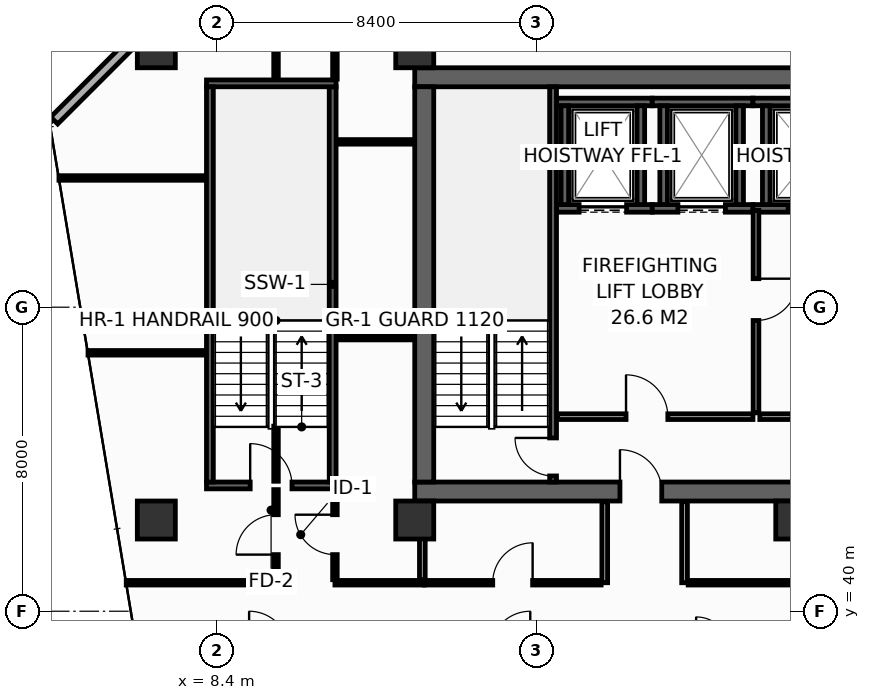
"""IFC4 building model, lengths in metres.
Left out: names, types, materials, properties, quantities, classifications, styles, units other than length and angle.
Written with IfcOpenShell. Run it as: python <this file> out.ifc"""

import sys

from ifc_helpers import new_model, si_unit, direction, frame, frame_2d, origin, origin_2d, place, context, subcontext, project, spatial, rectangle, hollow_rectangle, extrude, element, fill, save


model = new_model("IFC4")
c1 = context("Model", 3, precision=1e-05, world=origin(), true_north=direction((0.0, 1.0)))
c2 = subcontext(c1, "Body", "Model", "MODEL_VIEW")
j1 = project(units=[si_unit("LENGTHUNIT", "METRE"), si_unit("PLANEANGLEUNIT", "RADIAN")], contexts=[c1])
p1 = place(None, origin())
s1 = spatial("IfcSite", under=j1, at=p1, CompositionType="ELEMENT")
p2 = place(p1, origin())
s2 = spatial("IfcBuilding", under=s1, at=p2, CompositionType="ELEMENT")
p3 = place(p2, frame((0.0, 0.0, 137.2)))
s3 = spatial("IfcBuildingStorey", under=s2, at=p3, CompositionType="ELEMENT", Elevation=137.2)
p4 = place(p3, frame((13.6, 43.15, 0.0), z_axis=(0.0, 0.0, 1.0), x_axis=(1.0, 0.0, 0.0)))
e1 = element("IfcWall", 1, at=p4, inside=s3, PredefinedType="SHEAR", context=c2, shape_type="SweptSolid", body=[
    extrude(rectangle(XDim=32.7, YDim=0.5, at=frame_2d((16.35, 0.0))), origin(), (0.0, 0.0, 1.0), 3.55),
])
p5 = place(p4, frame((5.4, 0.0, 0.0)))
e2 = element("IfcOpeningElement", 2, at=p5, cuts=e1, PredefinedType="OPENING", context=c2, shape_type="SweptSolid", body=[
    extrude(rectangle(XDim=1.1, YDim=2.15, at=frame_2d((0.55, 1.075))), frame((0.0, 0.26, 0.0), z_axis=(0.0, -1.0, 0.0), x_axis=(1.0, 0.0, 0.0)), (0.0, 0.0, 1.0), 0.52),
])
p6 = place(p4, frame((25.6, 0.0, 0.0)))
e3 = element("IfcOpeningElement", 3, at=p6, cuts=e1, PredefinedType="OPENING", context=c2, shape_type="SweptSolid", body=[
    extrude(rectangle(XDim=1.1, YDim=2.15, at=frame_2d((0.55, 1.075))), frame((0.0, 0.26, 0.0), z_axis=(0.0, -1.0, 0.0), x_axis=(1.0, 0.0, 0.0)), (0.0, 0.0, 1.0), 0.52),
])
p7 = place(p3, frame((13.6, 54.05, 0.0), z_axis=(0.0, 0.0, 1.0), x_axis=(1.0, 0.0, 0.0)))
e4 = element("IfcWall", 4, at=p7, inside=s3, PredefinedType="SHEAR", context=c2, shape_type="SweptSolid", body=[
    extrude(rectangle(XDim=32.7, YDim=0.5, at=frame_2d((16.35, 0.0))), origin(), (0.0, 0.0, 1.0), 3.55),
])
p8 = place(p3, frame((13.85, 43.4, 0.0), z_axis=(0.0, 0.0, 1.0), x_axis=(0.0, 1.0, 0.0)))
e5 = element("IfcWall", 5, at=p8, inside=s3, PredefinedType="SHEAR", context=c2, shape_type="SweptSolid", body=[
    extrude(rectangle(XDim=10.4, YDim=0.5, at=frame_2d((5.2, 0.0))), origin(), (0.0, 0.0, 1.0), 3.55),
])
for number, where, z_axis, x_axis in (
    (6, (6.8, 54.8, 0.0), (0.0, 0.0, 1.0), (1.0, 0.0, 0.0)),
    (7, (13.6, 54.8, 0.0), (0.0, 0.0, 1.0), (1.0, 0.0, 0.0)),
    (8, (6.8, 42.4, 0.0), (0.0, 0.0, 1.0), (1.0, 0.0, 0.0)),
    (9, (13.6, 42.4, 0.0), (0.0, 0.0, 1.0), (1.0, 0.0, 0.0)),
    (10, (23.6, 42.4, 0.0), (0.0, 0.0, 1.0), (1.0, 0.0, 0.0)),
):
    element("IfcColumn", number, at=place(p3, frame(where, z_axis=z_axis, x_axis=x_axis)), inside=s3, PredefinedType="COLUMN", context=c2, shape_type="SweptSolid", body=[
        extrude(hollow_rectangle(XDim=1.0, YDim=1.0, WallThickness=0.045, at=origin_2d()), origin(), (0.0, 0.0, 1.0), 3.8),
    ])
p9 = place(p3, frame((17.33, 50.6, 0.0), z_axis=(0.0, 0.0, 1.0), x_axis=(1.0, 0.0, 0.0)))
e11 = element("IfcWall", 11, at=p9, inside=s3, PredefinedType="SHEAR", context=c2, shape_type="SweptSolid", body=[
    extrude(rectangle(XDim=2.52, YDim=0.2, at=frame_2d((1.26, 0.0))), origin(), (0.0, 0.0, 1.0), 3.55),
])
p10 = place(p9, frame((0.595, 0.0, 0.0)))
e12 = element("IfcOpeningElement", 12, at=p10, cuts=e11, PredefinedType="OPENING", context=c2, shape_type="SweptSolid", body=[
    extrude(rectangle(XDim=1.25, YDim=2.3, at=frame_2d((0.625, 1.15))), frame((0.0, 0.11, 0.0), z_axis=(0.0, -1.0, 0.0), x_axis=(1.0, 0.0, 0.0)), (0.0, 0.0, 1.0), 0.22),
])
p11 = place(p3, frame((17.33, 53.4, 0.0), z_axis=(0.0, 0.0, 1.0), x_axis=(1.0, 0.0, 0.0)))
e13 = element("IfcWall", 13, at=p11, inside=s3, PredefinedType="SHEAR", context=c2, shape_type="SweptSolid", body=[
    extrude(rectangle(XDim=2.52, YDim=0.2, at=frame_2d((1.26, 0.0))), origin(), (0.0, 0.0, 1.0), 3.55),
])
for number, where, z_axis, x_axis in (
    (14, (17.55, 50.7, 0.0), (0.0, 0.0, 1.0), (0.0, 1.0, 0.0)),
    (15, (19.55, 50.7, 0.0), (0.0, 0.0, 1.0), (0.0, 1.0, 0.0)),
):
    element("IfcWall", number, at=place(p3, frame(where, z_axis=z_axis, x_axis=x_axis)), inside=s3, PredefinedType="SHEAR", context=c2, shape_type="SweptSolid", body=[
        extrude(rectangle(XDim=2.6, YDim=0.2, at=frame_2d((1.3, 0.0))), origin(), (0.0, 0.0, 1.0), 3.55),
    ])
p12 = place(p3, frame((19.85, 50.6, 0.0), z_axis=(0.0, 0.0, 1.0), x_axis=(1.0, 0.0, 0.0)))
e16 = element("IfcWall", 16, at=p12, inside=s3, PredefinedType="SHEAR", context=c2, shape_type="SweptSolid", body=[
    extrude(rectangle(XDim=2.65, YDim=0.2, at=frame_2d((1.325, 0.0))), origin(), (0.0, 0.0, 1.0), 3.55),
])
p13 = place(p12, frame((0.675, 0.0, 0.0)))
e17 = element("IfcOpeningElement", 17, at=p13, cuts=e16, PredefinedType="OPENING", context=c2, shape_type="SweptSolid", body=[
    extrude(rectangle(XDim=1.25, YDim=2.3, at=frame_2d((0.625, 1.15))), frame((0.0, 0.11, 0.0), z_axis=(0.0, -1.0, 0.0), x_axis=(1.0, 0.0, 0.0)), (0.0, 0.0, 1.0), 0.22),
])
p14 = place(p3, frame((19.85, 53.4, 0.0), z_axis=(0.0, 0.0, 1.0), x_axis=(1.0, 0.0, 0.0)))
e18 = element("IfcWall", 18, at=p14, inside=s3, PredefinedType="SHEAR", context=c2, shape_type="SweptSolid", body=[
    extrude(rectangle(XDim=2.65, YDim=0.2, at=frame_2d((1.325, 0.0))), origin(), (0.0, 0.0, 1.0), 3.55),
])
for number, where, z_axis, x_axis in (
    (19, (20.15, 50.7, 0.0), (0.0, 0.0, 1.0), (0.0, 1.0, 0.0)),
    (20, (22.15, 50.7, 0.0), (0.0, 0.0, 1.0), (0.0, 1.0, 0.0)),
):
    element("IfcWall", number, at=place(p3, frame(where, z_axis=z_axis, x_axis=x_axis)), inside=s3, PredefinedType="SHEAR", context=c2, shape_type="SweptSolid", body=[
        extrude(rectangle(XDim=2.6, YDim=0.2, at=frame_2d((1.3, 0.0))), origin(), (0.0, 0.0, 1.0), 3.55),
    ])
p15 = place(p3, frame((22.5, 50.6, 0.0), z_axis=(0.0, 0.0, 1.0), x_axis=(1.0, 0.0, 0.0)))
e21 = element("IfcWall", 21, at=p15, inside=s3, PredefinedType="SHEAR", context=c2, shape_type="SweptSolid", body=[
    extrude(rectangle(XDim=2.85, YDim=0.2, at=frame_2d((1.425, 0.0))), origin(), (0.0, 0.0, 1.0), 3.55),
])
p16 = place(p15, frame((0.925, 0.0, 0.0)))
e22 = element("IfcOpeningElement", 22, at=p16, cuts=e21, PredefinedType="OPENING", context=c2, shape_type="SweptSolid", body=[
    extrude(rectangle(XDim=1.25, YDim=2.3, at=frame_2d((0.625, 1.15))), frame((0.0, 0.11, 0.0), z_axis=(0.0, -1.0, 0.0), x_axis=(1.0, 0.0, 0.0)), (0.0, 0.0, 1.0), 0.22),
])
p17 = place(p3, frame((22.5, 53.4, 0.0), z_axis=(0.0, 0.0, 1.0), x_axis=(1.0, 0.0, 0.0)))
e23 = element("IfcWall", 23, at=p17, inside=s3, PredefinedType="SHEAR", context=c2, shape_type="SweptSolid", body=[
    extrude(rectangle(XDim=2.85, YDim=0.2, at=frame_2d((1.425, 0.0))), origin(), (0.0, 0.0, 1.0), 3.55),
])
p18 = place(p3, frame((22.85, 50.7, 0.0), z_axis=(0.0, 0.0, 1.0), x_axis=(0.0, 1.0, 0.0)))
e24 = element("IfcWall", 24, at=p18, inside=s3, PredefinedType="SHEAR", context=c2, shape_type="SweptSolid", body=[
    extrude(rectangle(XDim=2.6, YDim=0.2, at=frame_2d((1.3, 0.0))), origin(), (0.0, 0.0, 1.0), 3.55),
])
p19 = place(p3, frame((17.24, 43.4, 0.0), z_axis=(0.0, 0.0, 1.0), x_axis=(0.0, 1.0, 0.0)))
e25 = element("IfcWall", 25, at=p19, inside=s3, PredefinedType="SHEAR", context=c2, shape_type="SweptSolid", body=[
    extrude(rectangle(XDim=10.4, YDim=0.18, at=frame_2d((5.2, 0.0))), origin(), (0.0, 0.0, 1.0), 3.55),
])
p20 = place(p19, frame((0.16, 0.0, 0.0)))
e26 = element("IfcOpeningElement", 26, at=p20, cuts=e25, PredefinedType="OPENING", context=c2, shape_type="SweptSolid", body=[
    extrude(rectangle(XDim=1.0, YDim=2.15, at=frame_2d((0.5, 1.075))), frame((0.0, 0.1, 0.0), z_axis=(0.0, -1.0, 0.0), x_axis=(1.0, 0.0, 0.0)), (0.0, 0.0, 1.0), 0.2),
])
p21 = place(p3, frame((8.12, 43.31, 0.0), z_axis=(0.0, 0.0, 1.0), x_axis=(1.0, 0.0, 0.0)))
e27 = element("IfcWall", 27, at=p21, inside=s3, PredefinedType="SHEAR", context=c2, shape_type="SweptSolid", body=[
    extrude(rectangle(XDim=3.41, YDim=0.18, at=frame_2d((1.705, 0.0))), origin(), (0.0, 0.0, 1.0), 3.55),
])
p22 = place(p21, frame((1.15, 0.0, 0.0)))
e28 = element("IfcOpeningElement", 28, at=p22, cuts=e27, PredefinedType="OPENING", context=c2, shape_type="SweptSolid", body=[
    extrude(rectangle(XDim=1.1, YDim=2.15, at=frame_2d((0.55, 1.075))), frame((0.0, 0.1, 0.0), z_axis=(0.0, -1.0, 0.0), x_axis=(1.0, 0.0, 0.0)), (0.0, 0.0, 1.0), 0.2),
])
p23 = place(p3, frame((11.44, 43.4, 0.0), z_axis=(0.0, 0.0, 1.0), x_axis=(0.0, 1.0, 0.0)))
e29 = element("IfcWall", 29, at=p23, inside=s3, PredefinedType="SHEAR", context=c2, shape_type="SweptSolid", body=[
    extrude(rectangle(XDim=10.4, YDim=0.18, at=frame_2d((5.2, 0.0))), origin(), (0.0, 0.0, 1.0), 3.55),
])
p24 = place(p3, frame((11.53, 53.89, 0.0), z_axis=(0.0, 0.0, 1.0), x_axis=(-1.0, 0.0, 0.0)))
e30 = element("IfcWall", 30, at=p24, inside=s3, PredefinedType="SHEAR", context=c2, shape_type="SweptSolid", body=[
    extrude(rectangle(XDim=3.41, YDim=0.18, at=frame_2d((1.705, 0.0))), origin(), (0.0, 0.0, 1.0), 3.55),
])
p25 = place(p3, frame((8.21, 53.8, 0.0), z_axis=(0.0, 0.0, 1.0), x_axis=(0.0, -1.0, 0.0)))
e31 = element("IfcWall", 31, at=p25, inside=s3, PredefinedType="SHEAR", context=c2, shape_type="SweptSolid", body=[
    extrude(rectangle(XDim=10.4, YDim=0.18, at=frame_2d((5.2, 0.0))), origin(), (0.0, 0.0, 1.0), 3.55),
])
p26 = place(p3, frame((17.36, 45.12, 0.0), z_axis=(0.0, 0.0, 1.0), x_axis=(1.0, 0.0, 0.0)))
e32 = element("IfcWall", 32, at=p26, inside=s3, PredefinedType="PARTITIONING", context=c2, shape_type="SweptSolid", body=[
    extrude(rectangle(XDim=5.14, YDim=0.15, at=frame_2d((2.57, 0.0))), origin(), (0.0, 0.0, 1.0), 3.55),
])
p27 = place(p26, frame((1.8, 0.0, 0.0)))
e33 = element("IfcOpeningElement", 33, at=p27, cuts=e32, PredefinedType="OPENING", context=c2, shape_type="SweptSolid", body=[
    extrude(rectangle(XDim=1.1, YDim=2.15, at=frame_2d((0.55, 1.075))), frame((0.0, 0.085, 0.0), z_axis=(0.0, -1.0, 0.0), x_axis=(1.0, 0.0, 0.0)), (0.0, 0.0, 1.0), 0.17),
])
p28 = place(p3, frame((22.58, 50.55, 0.0), z_axis=(0.0, 0.0, 1.0), x_axis=(0.0, -1.0, 0.0)))
e34 = element("IfcWall", 34, at=p28, inside=s3, PredefinedType="PARTITIONING", context=c2, shape_type="SweptSolid", body=[
    extrude(rectangle(XDim=5.33, YDim=0.15, at=frame_2d((2.665, 0.0))), origin(), (0.0, 0.0, 1.0), 3.55),
])
p29 = place(p28, frame((1.8, 0.0, 0.0)))
e35 = element("IfcOpeningElement", 35, at=p29, cuts=e34, PredefinedType="OPENING", context=c2, shape_type="SweptSolid", body=[
    extrude(rectangle(XDim=1.1, YDim=2.15, at=frame_2d((0.55, 1.075))), frame((0.0, 0.085, 0.0), z_axis=(0.0, -1.0, 0.0), x_axis=(1.0, 0.0, 0.0)), (0.0, 0.0, 1.0), 0.17),
])
p30 = place(p3, frame((22.68, 45.12, 0.0), z_axis=(0.0, 0.0, 1.0), x_axis=(1.0, 0.0, 0.0)))
e36 = element("IfcWall", 36, at=p30, inside=s3, PredefinedType="PARTITIONING", context=c2, shape_type="SweptSolid", body=[
    extrude(rectangle(XDim=2.92, YDim=0.15, at=frame_2d((1.46, 0.0))), origin(), (0.0, 0.0, 1.0), 3.55),
])
p31 = place(p30, frame((0.85, 0.0, 0.0)))
e37 = element("IfcOpeningElement", 37, at=p31, cuts=e36, PredefinedType="OPENING", context=c2, shape_type="SweptSolid", body=[
    extrude(rectangle(XDim=1.1, YDim=2.15, at=frame_2d((0.55, 1.075))), frame((0.0, 0.085, 0.0), z_axis=(0.0, -1.0, 0.0), x_axis=(1.0, 0.0, 0.0)), (0.0, 0.0, 1.0), 0.17),
])
p32 = place(p3, frame((7.087, 55.887, 0.0), z_axis=(0.0, 0.0, 1.0), x_axis=(-0.707106781187, -0.707106781187, 0.0)))
e38 = element("IfcWall", 38, at=p32, inside=s3, PredefinedType="STANDARD", context=c2, shape_type="SweptSolid", body=[
    extrude(rectangle(XDim=4.206, YDim=0.26, at=frame_2d((2.103, 0.0))), origin(), (0.0, 0.0, 1.0), 3.55),
])
p33 = place(p3, frame((6.008, 40.75, 0.0), z_axis=(0.0, 0.0, 1.0), x_axis=(1.0, 0.0, 0.0)))
e39 = element("IfcWall", 39, at=p33, inside=s3, PredefinedType="PARTITIONING", context=c2, shape_type="SweptSolid", body=[
    extrude(rectangle(XDim=3.942, YDim=0.12, at=frame_2d((1.971, 0.0))), origin(), (0.0, 0.0, 1.0), 3.035),
])
p34 = place(p3, frame((11.5, 40.75, 0.0), z_axis=(0.0, 0.0, 1.0), x_axis=(1.0, 0.0, 0.0)))
e40 = element("IfcWall", 40, at=p34, inside=s3, PredefinedType="PARTITIONING", context=c2, shape_type="SweptSolid", body=[
    extrude(rectangle(XDim=2.35, YDim=0.12, at=frame_2d((1.175, 0.0))), origin(), (0.0, 0.0, 1.0), 3.55),
])
p35 = place(p3, frame((11.55, 52.35, 0.0), z_axis=(0.0, 0.0, 1.0), x_axis=(1.0, 0.0, 0.0)))
e41 = element("IfcWall", 41, at=p35, inside=s3, PredefinedType="PARTITIONING", context=c2, shape_type="SweptSolid", body=[
    extrude(rectangle(XDim=2.03, YDim=0.12, at=frame_2d((1.015, 0.0))), origin(), (0.0, 0.0, 1.0), 3.55),
])
p36 = place(p3, frame((11.5, 54.0, 0.0), z_axis=(0.0, 0.0, 1.0), x_axis=(0.0, 1.0, 0.0)))
e42 = element("IfcWall", 42, at=p36, inside=s3, PredefinedType="PARTITIONING", context=c2, shape_type="SweptSolid", body=[
    extrude(rectangle(XDim=1.995, YDim=0.12, at=frame_2d((0.998, 0.0))), origin(), (0.0, 0.0, 1.0), 2.935),
])
p37 = place(p3, frame((5.003, 46.8, 0.0), z_axis=(0.0, 0.0, 1.0), x_axis=(1.0, 0.0, 0.0)))
e43 = element("IfcWall", 43, at=p37, inside=s3, PredefinedType="PARTITIONING", context=c2, shape_type="SweptSolid", body=[
    extrude(rectangle(XDim=3.097, YDim=0.12, at=frame_2d((1.549, 0.0))), origin(), (0.0, 0.0, 1.0), 2.835),
])
p38 = place(p3, frame((4.238, 51.4, 0.0), z_axis=(0.0, 0.0, 1.0), x_axis=(1.0, 0.0, 0.0)))
e44 = element("IfcWall", 44, at=p38, inside=s3, PredefinedType="PARTITIONING", context=c2, shape_type="SweptSolid", body=[
    extrude(rectangle(XDim=3.862, YDim=0.12, at=frame_2d((1.931, 0.0))), origin(), (0.0, 0.0, 1.0), 2.835),
])
p39 = place(p3, frame((9.95, 40.83, 0.0), z_axis=(0.0, 0.0, 1.0), x_axis=(0.0, 1.0, 0.0)))
e45 = element("IfcWall", 45, at=p39, inside=s3, PredefinedType="PARTITIONING", context=c2, shape_type="SweptSolid", body=[
    extrude(rectangle(XDim=2.37, YDim=0.12, at=frame_2d((1.185, 0.0))), origin(), (0.0, 0.0, 1.0), 2.835),
])
p40 = place(p39, frame((0.66, 0.0, 0.0)))
e46 = element("IfcOpeningElement", 46, at=p40, cuts=e45, PredefinedType="OPENING", context=c2, shape_type="SweptSolid", body=[
    extrude(rectangle(XDim=1.05, YDim=2.15, at=frame_2d((0.525, 1.075))), frame((0.0, 0.07, 0.0), z_axis=(0.0, -1.0, 0.0), x_axis=(1.0, 0.0, 0.0)), (0.0, 0.0, 1.0), 0.14),
])
p41 = place(p3, frame((9.95, 43.42, 0.0), z_axis=(0.0, 0.0, 1.0), x_axis=(0.0, 1.0, 0.0)))
e47 = element("IfcWall", 47, at=p41, inside=s3, PredefinedType="PARTITIONING", context=c2, shape_type="SweptSolid", body=[
    extrude(rectangle(XDim=1.45, YDim=0.12, at=frame_2d((0.725, 0.0))), origin(), (0.0, 0.0, 1.0), 3.55),
])
p42 = place(p3, frame((9.95, 54.0, 0.0), z_axis=(0.0, 0.0, 1.0), x_axis=(0.0, 1.0, 0.0)))
e48 = element("IfcWall", 48, at=p42, inside=s3, PredefinedType="PARTITIONING", context=c2, shape_type="SweptSolid", body=[
    extrude(rectangle(XDim=1.995, YDim=0.12, at=frame_2d((0.998, 0.0))), origin(), (0.0, 0.0, 1.0), 2.935),
])
p43 = place(p3, frame((11.55, 47.2, 0.0), z_axis=(0.0, 0.0, 1.0), x_axis=(1.0, 0.0, 0.0)))
e49 = element("IfcWall", 49, at=p43, inside=s3, PredefinedType="PARTITIONING", context=c2, shape_type="SweptSolid", body=[
    extrude(rectangle(XDim=2.03, YDim=0.12, at=frame_2d((1.015, 0.0))), origin(), (0.0, 0.0, 1.0), 3.55),
])
p44 = place(p3, frame((11.5, 40.83, 0.0), z_axis=(0.0, 0.0, 1.0), x_axis=(0.0, 1.0, 0.0)))
e50 = element("IfcWall", 50, at=p44, inside=s3, PredefinedType="PARTITIONING", context=c2, shape_type="SweptSolid", body=[
    extrude(rectangle(XDim=2.37, YDim=0.12, at=frame_2d((1.185, 0.0))), origin(), (0.0, 0.0, 1.0), 2.835),
])
p45 = place(p44, frame((0.66, 0.0, 0.0)))
e51 = element("IfcOpeningElement", 51, at=p45, cuts=e50, PredefinedType="OPENING", context=c2, shape_type="SweptSolid", body=[
    extrude(rectangle(XDim=1.05, YDim=2.15, at=frame_2d((0.525, 1.075))), frame((0.0, 0.07, 0.0), z_axis=(0.0, -1.0, 0.0), x_axis=(1.0, 0.0, 0.0)), (0.0, 0.0, 1.0), 0.14),
])
p46 = place(p3, frame((13.8, 40.83, 0.0), z_axis=(0.0, 0.0, 1.0), x_axis=(0.0, 1.0, 0.0)))
e52 = element("IfcWall", 52, at=p46, inside=s3, PredefinedType="PARTITIONING", context=c2, shape_type="SweptSolid", body=[
    extrude(rectangle(XDim=2.05, YDim=0.15, at=frame_2d((1.025, 0.0))), origin(), (0.0, 0.0, 1.0), 3.55),
])
for number, where, z_axis, x_axis in (
    (53, (18.6, 40.75, 0.0), (0.0, 0.0, 1.0), (0.0, 1.0, 0.0)),
    (54, (20.7, 40.75, 0.0), (0.0, 0.0, 1.0), (0.0, 1.0, 0.0)),
):
    element("IfcWall", number, at=place(p3, frame(where, z_axis=z_axis, x_axis=x_axis)), inside=s3, PredefinedType="PARTITIONING", context=c2, shape_type="SweptSolid", body=[
        extrude(rectangle(XDim=2.13, YDim=0.15, at=frame_2d((1.065, 0.0))), origin(), (0.0, 0.0, 1.0), 3.55),
    ])
p47 = place(p3, frame((13.85, 40.75, 0.0), z_axis=(0.0, 0.0, 1.0), x_axis=(1.0, 0.0, 0.0)))
e55 = element("IfcWall", 55, at=p47, inside=s3, PredefinedType="PARTITIONING", context=c2, shape_type="SweptSolid", body=[
    extrude(rectangle(XDim=4.655, YDim=0.12, at=frame_2d((2.327, 0.0))), origin(), (0.0, 0.0, 1.0), 3.55),
])
p48 = place(p47, frame((1.802, 0.0, 0.0)))
e56 = element("IfcOpeningElement", 56, at=p48, cuts=e55, PredefinedType="OPENING", context=c2, shape_type="SweptSolid", body=[
    extrude(rectangle(XDim=1.05, YDim=2.15, at=frame_2d((0.525, 1.075))), frame((0.0, 0.07, 0.0), z_axis=(0.0, -1.0, 0.0), x_axis=(1.0, 0.0, 0.0)), (0.0, 0.0, 1.0), 0.14),
])
p49 = place(p3, frame((20.795, 40.75, 0.0), z_axis=(0.0, 0.0, 1.0), x_axis=(1.0, 0.0, 0.0)))
e57 = element("IfcWall", 57, at=p49, inside=s3, PredefinedType="PARTITIONING", context=c2, shape_type="SweptSolid", body=[
    extrude(rectangle(XDim=17.91, YDim=0.12, at=frame_2d((8.955, 0.0))), origin(), (0.0, 0.0, 1.0), 2.835),
])
p50 = place(p49, frame((8.43, 0.0, 0.0)))
e58 = element("IfcOpeningElement", 58, at=p50, cuts=e57, PredefinedType="OPENING", context=c2, shape_type="SweptSolid", body=[
    extrude(rectangle(XDim=1.05, YDim=2.15, at=frame_2d((0.525, 1.075))), frame((0.0, 0.07, 0.0), z_axis=(0.0, -1.0, 0.0), x_axis=(1.0, 0.0, 0.0)), (0.0, 0.0, 1.0), 0.14),
])
p51 = place(p10, origin())
e59 = element("IfcDoor", 59, at=p51, inside=s3, OperationType="SLIDING_TO_LEFT", PredefinedType="DOOR", context=c2, shape_type="SweptSolid", body=[
    extrude(rectangle(XDim=1.25, YDim=2.3, at=frame_2d((0.625, 1.15))), frame((0.0, 0.025, 0.0), z_axis=(0.0, -1.0, 0.0), x_axis=(1.0, 0.0, 0.0)), (0.0, 0.0, 1.0), 0.05),
])
fill(e12, e59)
p52 = place(p13, origin())
e60 = element("IfcDoor", 60, at=p52, inside=s3, OperationType="SLIDING_TO_LEFT", PredefinedType="DOOR", context=c2, shape_type="SweptSolid", body=[
    extrude(rectangle(XDim=1.25, YDim=2.3, at=frame_2d((0.625, 1.15))), frame((0.0, 0.025, 0.0), z_axis=(0.0, -1.0, 0.0), x_axis=(1.0, 0.0, 0.0)), (0.0, 0.0, 1.0), 0.05),
])
fill(e17, e60)
p53 = place(p16, origin())
e61 = element("IfcDoor", 61, at=p53, inside=s3, OperationType="SLIDING_TO_LEFT", PredefinedType="DOOR", context=c2, shape_type="SweptSolid", body=[
    extrude(rectangle(XDim=1.25, YDim=2.3, at=frame_2d((0.625, 1.15))), frame((0.0, 0.025, 0.0), z_axis=(0.0, -1.0, 0.0), x_axis=(1.0, 0.0, 0.0)), (0.0, 0.0, 1.0), 0.05),
])
fill(e22, e61)
p54 = place(p20, origin())
e62 = element("IfcDoor", 62, at=p54, inside=s3, OperationType="SINGLE_SWING_RIGHT", PredefinedType="DOOR", context=c2, shape_type="SweptSolid", body=[
    extrude(rectangle(XDim=1.0, YDim=2.15, at=frame_2d((0.5, 1.075))), frame((0.0, 0.025, 0.0), z_axis=(0.0, -1.0, 0.0), x_axis=(1.0, 0.0, 0.0)), (0.0, 0.0, 1.0), 0.05),
])
fill(e26, e62)
p55 = place(p22, origin())
e63 = element("IfcDoor", 63, at=p55, inside=s3, OperationType="SINGLE_SWING_LEFT", PredefinedType="DOOR", context=c2, shape_type="SweptSolid", body=[
    extrude(rectangle(XDim=1.1, YDim=2.15, at=frame_2d((0.55, 1.075))), frame((0.0, 0.025, 0.0), z_axis=(0.0, -1.0, 0.0), x_axis=(1.0, 0.0, 0.0)), (0.0, 0.0, 1.0), 0.05),
])
fill(e28, e63)
p56 = place(p27, origin())
e64 = element("IfcDoor", 64, at=p56, inside=s3, OperationType="SINGLE_SWING_LEFT", PredefinedType="DOOR", context=c2, shape_type="SweptSolid", body=[
    extrude(rectangle(XDim=1.1, YDim=2.15, at=frame_2d((0.55, 1.075))), frame((0.0, 0.025, 0.0), z_axis=(0.0, -1.0, 0.0), x_axis=(1.0, 0.0, 0.0)), (0.0, 0.0, 1.0), 0.05),
])
fill(e33, e64)
p57 = place(p29, origin())
e65 = element("IfcDoor", 65, at=p57, inside=s3, OperationType="SINGLE_SWING_LEFT", PredefinedType="DOOR", context=c2, shape_type="SweptSolid", body=[
    extrude(rectangle(XDim=1.1, YDim=2.15, at=frame_2d((0.55, 1.075))), frame((0.0, 0.025, 0.0), z_axis=(0.0, -1.0, 0.0), x_axis=(1.0, 0.0, 0.0)), (0.0, 0.0, 1.0), 0.05),
])
fill(e35, e65)
p58 = place(p5, origin())
e66 = element("IfcDoor", 66, at=p58, inside=s3, OperationType="SINGLE_SWING_LEFT", PredefinedType="DOOR", context=c2, shape_type="SweptSolid", body=[
    extrude(rectangle(XDim=1.1, YDim=2.15, at=frame_2d((0.55, 1.075))), frame((0.0, 0.025, 0.0), z_axis=(0.0, -1.0, 0.0), x_axis=(1.0, 0.0, 0.0)), (0.0, 0.0, 1.0), 0.05),
])
fill(e2, e66)
p59 = place(p40, origin())
e67 = element("IfcDoor", 67, at=p59, inside=s3, OperationType="SINGLE_SWING_LEFT", PredefinedType="DOOR", context=c2, shape_type="SweptSolid", body=[
    extrude(rectangle(XDim=1.05, YDim=2.15, at=frame_2d((0.525, 1.075))), frame((0.0, 0.025, 0.0), z_axis=(0.0, -1.0, 0.0), x_axis=(1.0, 0.0, 0.0)), (0.0, 0.0, 1.0), 0.05),
])
fill(e46, e67)
p60 = place(p45, origin())
e68 = element("IfcDoor", 68, at=p60, inside=s3, OperationType="SINGLE_SWING_RIGHT", PredefinedType="DOOR", context=c2, shape_type="SweptSolid", body=[
    extrude(rectangle(XDim=1.05, YDim=2.15, at=frame_2d((0.525, 1.075))), frame((0.0, 0.025, 0.0), z_axis=(0.0, -1.0, 0.0), x_axis=(1.0, 0.0, 0.0)), (0.0, 0.0, 1.0), 0.05),
])
fill(e51, e68)
p61 = place(p48, origin())
e69 = element("IfcDoor", 69, at=p61, inside=s3, OperationType="SINGLE_SWING_RIGHT", PredefinedType="DOOR", context=c2, shape_type="SweptSolid", body=[
    extrude(rectangle(XDim=1.05, YDim=2.15, at=frame_2d((0.525, 1.075))), frame((0.0, 0.025, 0.0), z_axis=(0.0, -1.0, 0.0), x_axis=(1.0, 0.0, 0.0)), (0.0, 0.0, 1.0), 0.05),
])
fill(e56, e69)
save(model, sys.argv[1])
